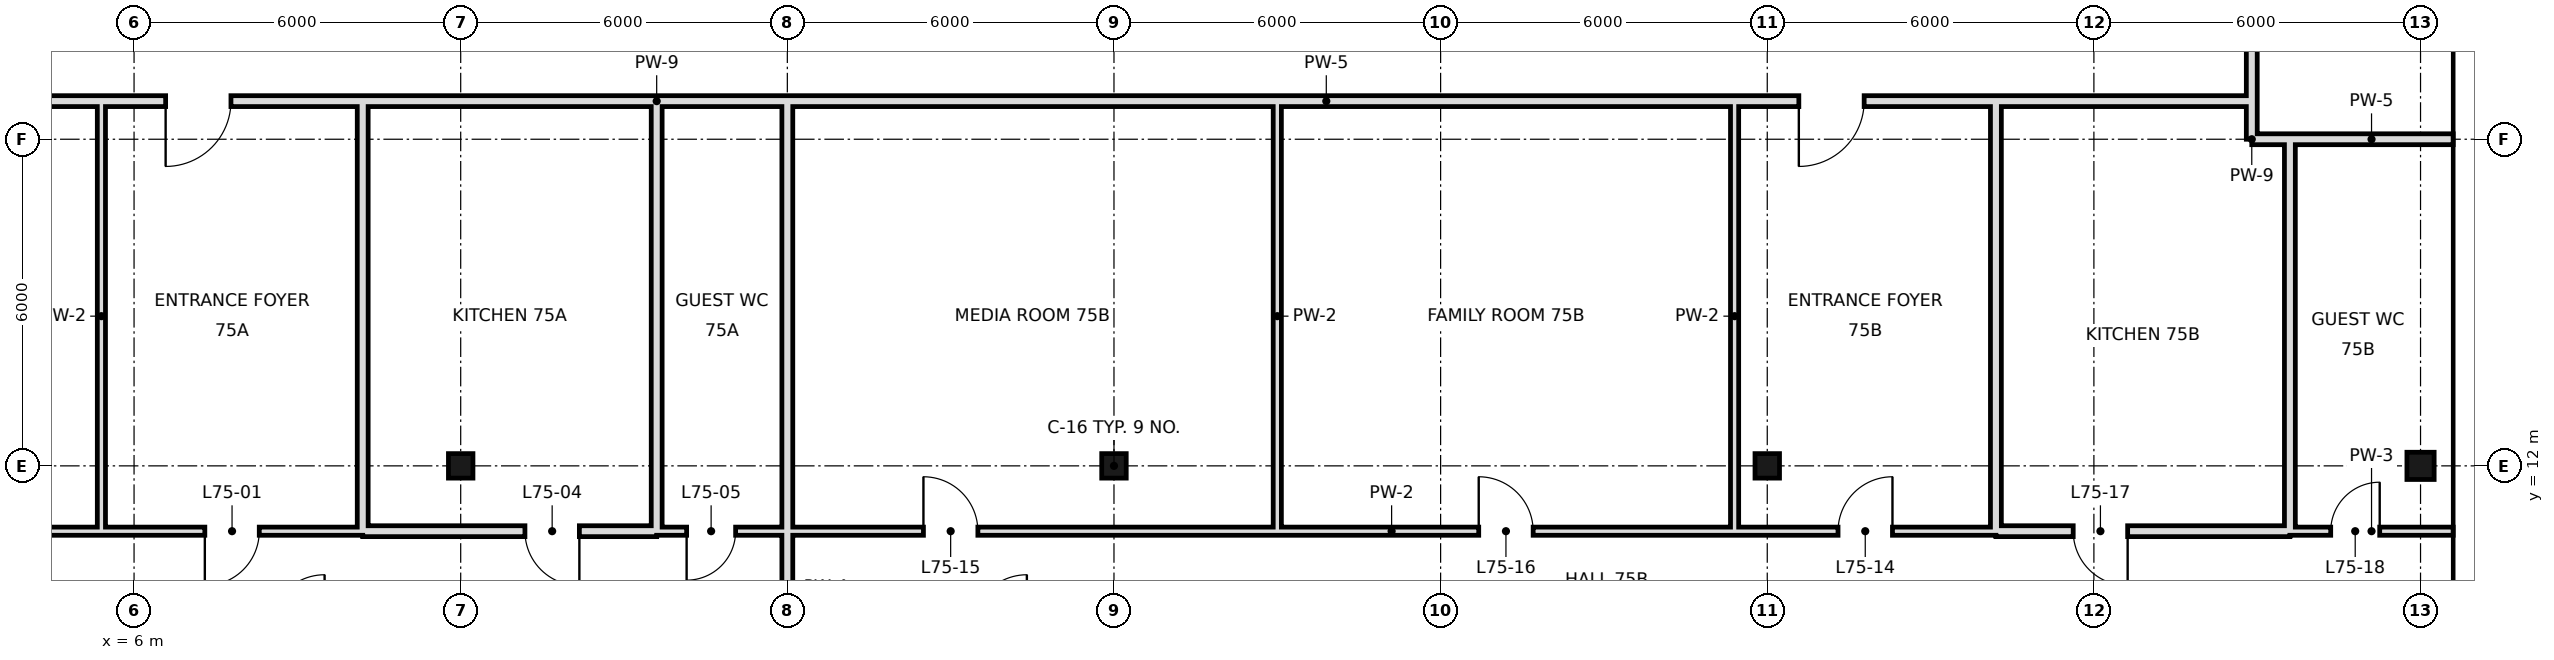
"""IFC4 building model, lengths in metres.
Left out: names, types, materials, properties, quantities, classifications, styles, units other than length and angle.
Written with IfcOpenShell. Run it as: python <this file> out.ifc"""

import sys

from ifc_helpers import new_model, si_unit, direction, frame, frame_2d, origin, origin_2d, place, context, subcontext, project, spatial, rectangle, hollow_rectangle, extrude, element, fill, save


model = new_model("IFC4")
c1 = context("Model", 3, precision=1e-05, world=origin(), true_north=direction((0.0, 1.0)))
c2 = subcontext(c1, "Body", "Model", "MODEL_VIEW")
j1 = project(units=[si_unit("LENGTHUNIT", "METRE"), si_unit("PLANEANGLEUNIT", "RADIAN")], contexts=[c1])
p1 = place(None, origin())
s1 = spatial("IfcSite", under=j1, at=p1, CompositionType="ELEMENT")
p2 = place(p1, origin())
s2 = spatial("IfcBuilding", under=s1, at=p2, CompositionType="ELEMENT")
p3 = place(p2, frame((0.0, 0.0, 316.0)))
s3 = spatial("IfcBuildingStorey", under=s2, at=p3, CompositionType="ELEMENT", Elevation=316.0)
for number, where, z_axis, x_axis in (
    (1, (12.0, 12.0, 0.0), (0.0, 0.0, 1.0), (1.0, 0.0, 0.0)),
    (2, (24.0, 12.0, 0.0), (0.0, 0.0, 1.0), (1.0, 0.0, 0.0)),
    (3, (36.0, 12.0, 0.0), (0.0, 0.0, 1.0), (1.0, 0.0, 0.0)),
):
    element("IfcColumn", number, at=place(p3, frame(where, z_axis=z_axis, x_axis=x_axis)), inside=s3, PredefinedType="COLUMN", context=c2, shape_type="SweptSolid", body=[
        extrude(hollow_rectangle(XDim=0.45, YDim=0.45, WallThickness=0.022, at=origin_2d()), origin(), (0.0, 0.0, 1.0), 3.6),
    ])
p4 = place(p3, frame((48.0, 12.0, 0.0), z_axis=(0.0, 0.0, 1.0), x_axis=(1.0, 0.0, 0.0)))
e4 = element("IfcColumn", 4, at=p4, inside=s3, PredefinedType="COLUMN", context=c2, shape_type="SweptSolid", body=[
    extrude(hollow_rectangle(XDim=0.5, YDim=0.5, WallThickness=0.025, at=origin_2d()), origin(), (0.0, 0.0, 1.0), 3.6),
])
for number, where, z_axis, x_axis in (
    (5, (10.2, 10.8, 0.0), (0.0, 0.0, 1.0), (0.0, 1.0, 0.0)),
    (6, (15.6, 10.8, 0.0), (0.0, 0.0, 1.0), (0.0, 1.0, 0.0)),
):
    element("IfcWall", number, at=place(p3, frame(where, z_axis=z_axis, x_axis=x_axis)), inside=s3, PredefinedType="SOLIDWALL", context=c2, shape_type="SweptSolid", body=[
        extrude(rectangle(XDim=7.9, YDim=0.2, at=frame_2d((3.95, 0.0))), origin(), (0.0, 0.0, 1.0), 2.72),
    ])
p5 = place(p3, frame((18.0, -0.6, 0.0), z_axis=(0.0, 0.0, 1.0), x_axis=(0.0, 1.0, 0.0)))
e7 = element("IfcWall", 7, at=p5, inside=s3, PredefinedType="SOLIDWALL", context=c2, shape_type="SweptSolid", body=[
    extrude(rectangle(XDim=19.3, YDim=0.2, at=frame_2d((9.65, 0.0))), origin(), (0.0, 0.0, 1.0), 2.72),
])
for number, where, z_axis, x_axis in (
    (8, (27.0, 10.8, 0.0), (0.0, 0.0, 1.0), (0.0, 1.0, 0.0)),
    (9, (35.4, 10.8, 0.0), (0.0, 0.0, 1.0), (0.0, 1.0, 0.0)),
):
    element("IfcWall", number, at=place(p3, frame(where, z_axis=z_axis, x_axis=x_axis)), inside=s3, PredefinedType="PARTITIONING", context=c2, shape_type="SweptSolid", body=[
        extrude(rectangle(XDim=7.9, YDim=0.15, at=frame_2d((3.95, 0.0))), origin(), (0.0, 0.0, 1.0), 3.42),
    ])
p6 = place(p3, frame((40.2, 10.8, 0.0), z_axis=(0.0, 0.0, 1.0), x_axis=(0.0, 1.0, 0.0)))
e10 = element("IfcWall", 10, at=p6, inside=s3, PredefinedType="SOLIDWALL", context=c2, shape_type="SweptSolid", body=[
    extrude(rectangle(XDim=7.9, YDim=0.2, at=frame_2d((3.95, 0.0))), origin(), (0.0, 0.0, 1.0), 2.72),
])
p7 = place(p3, frame((44.9, 18.7, 0.0), z_axis=(0.0, 0.0, 1.0), x_axis=(0.0, 1.0, 0.0)))
e11 = element("IfcWall", 11, at=p7, inside=s3, PredefinedType="SOLIDWALL", context=c2, shape_type="SweptSolid", body=[
    extrude(rectangle(XDim=27.249, YDim=0.2, at=frame_2d((13.625, 0.0))), origin(), (0.0, 0.0, 1.0), 2.97),
])
p8 = place(p7, frame((7.66, 0.0, 0.0)))
e12 = element("IfcOpeningElement", 12, at=p8, cuts=e11, PredefinedType="OPENING", context=c2, shape_type="SweptSolid", body=[
    extrude(rectangle(XDim=1.2, YDim=2.4, at=frame_2d((0.6, 1.2))), frame((0.0, 0.11, 0.0), z_axis=(0.0, -1.0, 0.0), x_axis=(1.0, 0.0, 0.0)), (0.0, 0.0, 1.0), 0.22),
])
p9 = place(p3, frame((44.9, 18.0, 0.0), z_axis=(0.0, 0.0, 1.0), x_axis=(0.0, 1.0, 0.0)))
e13 = element("IfcWall", 13, at=p9, inside=s3, PredefinedType="SOLIDWALL", context=c2, shape_type="SweptSolid", body=[
    extrude(rectangle(XDim=0.7, YDim=0.2, at=frame_2d((0.35, 0.0))), origin(), (0.0, 0.0, 1.0), 2.97),
])
p10 = place(p3, frame((45.6, 10.8, 0.0), z_axis=(0.0, 0.0, 1.0), x_axis=(0.0, 1.0, 0.0)))
e14 = element("IfcWall", 14, at=p10, inside=s3, PredefinedType="SOLIDWALL", context=c2, shape_type="SweptSolid", body=[
    extrude(rectangle(XDim=7.2, YDim=0.2, at=frame_2d((3.6, 0.0))), origin(), (0.0, 0.0, 1.0), 2.72),
])
p11 = place(p3, frame((5.4, 10.8, 0.0), z_axis=(0.0, 0.0, 1.0), x_axis=(0.0, 1.0, 0.0)))
e15 = element("IfcWall", 15, at=p11, inside=s3, PredefinedType="PARTITIONING", context=c2, shape_type="SweptSolid", body=[
    extrude(rectangle(XDim=7.9, YDim=0.15, at=frame_2d((3.95, 0.0))), origin(), (0.0, 0.0, 1.0), 3.42),
])
p12 = place(p3, frame((10.2, 10.8, 0.0), z_axis=(0.0, 0.0, 1.0), x_axis=(1.0, 0.0, 0.0)))
e16 = element("IfcWall", 16, at=p12, inside=s3, PredefinedType="SOLIDWALL", context=c2, shape_type="SweptSolid", body=[
    extrude(rectangle(XDim=5.4, YDim=0.2, at=frame_2d((2.7, 0.0))), origin(), (0.0, 0.0, 1.0), 2.72),
])
p13 = place(p12, frame((2.98, 0.0, 0.0)))
e17 = element("IfcOpeningElement", 17, at=p13, cuts=e16, PredefinedType="OPENING", context=c2, shape_type="SweptSolid", body=[
    extrude(rectangle(XDim=1.0, YDim=2.4, at=frame_2d((0.5, 1.2))), frame((0.0, 0.11, 0.0), z_axis=(0.0, -1.0, 0.0), x_axis=(1.0, 0.0, 0.0)), (0.0, 0.0, 1.0), 0.22),
])
p14 = place(p3, frame((40.2, 10.8, 0.0), z_axis=(0.0, 0.0, 1.0), x_axis=(1.0, 0.0, 0.0)))
e18 = element("IfcWall", 18, at=p14, inside=s3, PredefinedType="SOLIDWALL", context=c2, shape_type="SweptSolid", body=[
    extrude(rectangle(XDim=5.4, YDim=0.2, at=frame_2d((2.7, 0.0))), origin(), (0.0, 0.0, 1.0), 2.72),
])
p15 = place(p14, frame((1.42, 0.0, 0.0)))
e19 = element("IfcOpeningElement", 19, at=p15, cuts=e18, PredefinedType="OPENING", context=c2, shape_type="SweptSolid", body=[
    extrude(rectangle(XDim=1.0, YDim=2.4, at=frame_2d((0.5, 1.2))), frame((0.0, 0.11, 0.0), z_axis=(0.0, -1.0, 0.0), x_axis=(1.0, 0.0, 0.0)), (0.0, 0.0, 1.0), 0.22),
])
p16 = place(p3, frame((-18.6, 10.8, 0.0), z_axis=(0.0, 0.0, 1.0), x_axis=(1.0, 0.0, 0.0)))
e20 = element("IfcWall", 20, at=p16, inside=s3, PredefinedType="PARTITIONING", context=c2, shape_type="SweptSolid", body=[
    extrude(rectangle(XDim=28.8, YDim=0.15, at=frame_2d((14.4, 0.0))), origin(), (0.0, 0.0, 1.0), 3.42),
])
p17 = place(p16, frame((25.9, 0.0, 0.0)))
e21 = element("IfcOpeningElement", 21, at=p17, cuts=e20, PredefinedType="OPENING", context=c2, shape_type="SweptSolid", body=[
    extrude(rectangle(XDim=1.0, YDim=2.4, at=frame_2d((0.5, 1.2))), frame((0.0, 0.085, 0.0), z_axis=(0.0, -1.0, 0.0), x_axis=(1.0, 0.0, 0.0)), (0.0, 0.0, 1.0), 0.17),
])
p18 = place(p16, frame((11.35, 0.0, 0.0)))
e22 = element("IfcOpeningElement", 22, at=p18, cuts=e20, PredefinedType="OPENING", context=c2, shape_type="SweptSolid", body=[
    extrude(rectangle(XDim=1.0, YDim=2.4, at=frame_2d((0.5, 1.2))), frame((0.0, 0.085, 0.0), z_axis=(0.0, -1.0, 0.0), x_axis=(1.0, 0.0, 0.0)), (0.0, 0.0, 1.0), 0.17),
])
p19 = place(p16, frame((15.82, 0.0, 0.0)))
e23 = element("IfcOpeningElement", 23, at=p19, cuts=e20, PredefinedType="OPENING", context=c2, shape_type="SweptSolid", body=[
    extrude(rectangle(XDim=1.0, YDim=2.4, at=frame_2d((0.5, 1.2))), frame((0.0, 0.085, 0.0), z_axis=(0.0, -1.0, 0.0), x_axis=(1.0, 0.0, 0.0)), (0.0, 0.0, 1.0), 0.17),
])
p20 = place(p3, frame((18.0, 10.8, 0.0), z_axis=(0.0, 0.0, 1.0), x_axis=(1.0, 0.0, 0.0)))
e24 = element("IfcWall", 24, at=p20, inside=s3, PredefinedType="PARTITIONING", context=c2, shape_type="SweptSolid", body=[
    extrude(rectangle(XDim=22.2, YDim=0.15, at=frame_2d((11.1, 0.0))), origin(), (0.0, 0.0, 1.0), 3.42),
])
p21 = place(p20, frame((19.3, 0.0, 0.0)))
e25 = element("IfcOpeningElement", 25, at=p21, cuts=e24, PredefinedType="OPENING", context=c2, shape_type="SweptSolid", body=[
    extrude(rectangle(XDim=1.0, YDim=2.4, at=frame_2d((0.5, 1.2))), frame((0.0, 0.085, 0.0), z_axis=(0.0, -1.0, 0.0), x_axis=(1.0, 0.0, 0.0)), (0.0, 0.0, 1.0), 0.17),
])
p22 = place(p20, frame((2.5, 0.0, 0.0)))
e26 = element("IfcOpeningElement", 26, at=p22, cuts=e24, PredefinedType="OPENING", context=c2, shape_type="SweptSolid", body=[
    extrude(rectangle(XDim=1.0, YDim=2.4, at=frame_2d((0.5, 1.2))), frame((0.0, 0.085, 0.0), z_axis=(0.0, -1.0, 0.0), x_axis=(1.0, 0.0, 0.0)), (0.0, 0.0, 1.0), 0.17),
])
p23 = place(p20, frame((12.7, 0.0, 0.0)))
e27 = element("IfcOpeningElement", 27, at=p23, cuts=e24, PredefinedType="OPENING", context=c2, shape_type="SweptSolid", body=[
    extrude(rectangle(XDim=1.0, YDim=2.4, at=frame_2d((0.5, 1.2))), frame((0.0, 0.085, 0.0), z_axis=(0.0, -1.0, 0.0), x_axis=(1.0, 0.0, 0.0)), (0.0, 0.0, 1.0), 0.17),
])
p24 = place(p3, frame((15.6, 10.8, 0.0), z_axis=(0.0, 0.0, 1.0), x_axis=(1.0, 0.0, 0.0)))
e28 = element("IfcWall", 28, at=p24, inside=s3, PredefinedType="PARTITIONING", context=c2, shape_type="SweptSolid", body=[
    extrude(rectangle(XDim=2.4, YDim=0.15, at=frame_2d((1.2, 0.0))), origin(), (0.0, 0.0, 1.0), 3.42),
])
p25 = place(p24, frame((0.55, 0.0, 0.0)))
e29 = element("IfcOpeningElement", 29, at=p25, cuts=e28, PredefinedType="OPENING", context=c2, shape_type="SweptSolid", body=[
    extrude(rectangle(XDim=0.9, YDim=2.4, at=frame_2d((0.45, 1.2))), frame((0.0, 0.085, 0.0), z_axis=(0.0, -1.0, 0.0), x_axis=(1.0, 0.0, 0.0)), (0.0, 0.0, 1.0), 0.17),
])
p26 = place(p3, frame((45.6, 10.8, 0.0), z_axis=(0.0, 0.0, 1.0), x_axis=(1.0, 0.0, 0.0)))
e30 = element("IfcWall", 30, at=p26, inside=s3, PredefinedType="PARTITIONING", context=c2, shape_type="SweptSolid", body=[
    extrude(rectangle(XDim=3.0, YDim=0.15, at=frame_2d((1.5, 0.0))), origin(), (0.0, 0.0, 1.0), 3.42),
])
p27 = place(p26, frame((0.75, 0.0, 0.0)))
e31 = element("IfcOpeningElement", 31, at=p27, cuts=e30, PredefinedType="OPENING", context=c2, shape_type="SweptSolid", body=[
    extrude(rectangle(XDim=0.9, YDim=2.4, at=frame_2d((0.45, 1.2))), frame((0.0, 0.085, 0.0), z_axis=(0.0, -1.0, 0.0), x_axis=(1.0, 0.0, 0.0)), (0.0, 0.0, 1.0), 0.17),
])
p28 = place(p3, frame((45.6, 18.0, 0.0), z_axis=(0.0, 0.0, 1.0), x_axis=(1.0, 0.0, 0.0)))
e32 = element("IfcWall", 32, at=p28, inside=s3, PredefinedType="SOLIDWALL", context=c2, shape_type="SweptSolid", body=[
    extrude(rectangle(XDim=3.0, YDim=0.2, at=frame_2d((1.5, 0.0))), origin(), (0.0, 0.0, 1.0), 2.72),
])
p29 = place(p3, frame((44.9, 18.0, 0.0), z_axis=(0.0, 0.0, 1.0), x_axis=(1.0, 0.0, 0.0)))
e33 = element("IfcWall", 33, at=p29, inside=s3, PredefinedType="SOLIDWALL", context=c2, shape_type="SweptSolid", body=[
    extrude(rectangle(XDim=0.7, YDim=0.2, at=frame_2d((0.35, 0.0))), origin(), (0.0, 0.0, 1.0), 2.97),
])
p30 = place(p3, frame((3.1, 18.7, 0.0), z_axis=(0.0, 0.0, 1.0), x_axis=(1.0, 0.0, 0.0)))
e34 = element("IfcWall", 34, at=p30, inside=s3, PredefinedType="SOLIDWALL", context=c2, shape_type="SweptSolid", body=[
    extrude(rectangle(XDim=7.1, YDim=0.2, at=frame_2d((3.55, 0.0))), origin(), (0.0, 0.0, 1.0), 2.72),
])
p31 = place(p30, frame((3.48, 0.0, 0.0)))
e35 = element("IfcOpeningElement", 35, at=p31, cuts=e34, PredefinedType="OPENING", context=c2, shape_type="SweptSolid", body=[
    extrude(rectangle(XDim=1.2, YDim=2.4, at=frame_2d((0.6, 1.2))), frame((0.0, 0.11, 0.0), z_axis=(0.0, -1.0, 0.0), x_axis=(1.0, 0.0, 0.0)), (0.0, 0.0, 1.0), 0.22),
])
p32 = place(p3, frame((15.6, 18.7, 0.0), z_axis=(0.0, 0.0, 1.0), x_axis=(1.0, 0.0, 0.0)))
e36 = element("IfcWall", 36, at=p32, inside=s3, PredefinedType="SOLIDWALL", context=c2, shape_type="SweptSolid", body=[
    extrude(rectangle(XDim=24.6, YDim=0.2, at=frame_2d((12.3, 0.0))), origin(), (0.0, 0.0, 1.0), 2.72),
])
p33 = place(p32, frame((20.98, 0.0, 0.0)))
e37 = element("IfcOpeningElement", 37, at=p33, cuts=e36, PredefinedType="OPENING", context=c2, shape_type="SweptSolid", body=[
    extrude(rectangle(XDim=1.2, YDim=2.4, at=frame_2d((0.6, 1.2))), frame((0.0, 0.11, 0.0), z_axis=(0.0, -1.0, 0.0), x_axis=(1.0, 0.0, 0.0)), (0.0, 0.0, 1.0), 0.22),
])
p34 = place(p3, frame((10.2, 18.7, 0.0), z_axis=(0.0, 0.0, 1.0), x_axis=(1.0, 0.0, 0.0)))
e38 = element("IfcWall", 38, at=p34, inside=s3, PredefinedType="SOLIDWALL", context=c2, shape_type="SweptSolid", body=[
    extrude(rectangle(XDim=5.4, YDim=0.2, at=frame_2d((2.7, 0.0))), origin(), (0.0, 0.0, 1.0), 3.42),
])
p35 = place(p3, frame((40.2, 18.7, 0.0), z_axis=(0.0, 0.0, 1.0), x_axis=(1.0, 0.0, 0.0)))
e39 = element("IfcWall", 39, at=p35, inside=s3, PredefinedType="SOLIDWALL", context=c2, shape_type="SweptSolid", body=[
    extrude(rectangle(XDim=4.7, YDim=0.2, at=frame_2d((2.35, 0.0))), origin(), (0.0, 0.0, 1.0), 2.72),
])
p36 = place(p17, frame((1.0, 0.0, 0.0), z_axis=(0.0, 0.0, 1.0), x_axis=(-1.0, 0.0, 0.0)))
e40 = element("IfcDoor", 40, at=p36, inside=s3, OperationType="SINGLE_SWING_RIGHT", PredefinedType="DOOR", context=c2, shape_type="SweptSolid", body=[
    extrude(rectangle(XDim=1.0, YDim=2.4, at=frame_2d((0.5, 1.2))), frame((0.0, 0.025, 0.0), z_axis=(0.0, -1.0, 0.0), x_axis=(1.0, 0.0, 0.0)), (0.0, 0.0, 1.0), 0.05),
])
fill(e21, e40)
p37 = place(p13, origin())
e41 = element("IfcDoor", 41, at=p37, inside=s3, OperationType="SINGLE_SWING_RIGHT", PredefinedType="DOOR", context=c2, shape_type="SweptSolid", body=[
    extrude(rectangle(XDim=1.0, YDim=2.4, at=frame_2d((0.5, 1.2))), frame((0.0, 0.025, 0.0), z_axis=(0.0, -1.0, 0.0), x_axis=(1.0, 0.0, 0.0)), (0.0, 0.0, 1.0), 0.05),
])
fill(e17, e41)
p38 = place(p25, frame((0.9, 0.0, 0.0), z_axis=(0.0, 0.0, 1.0), x_axis=(-1.0, 0.0, 0.0)))
e42 = element("IfcDoor", 42, at=p38, inside=s3, OperationType="SINGLE_SWING_RIGHT", PredefinedType="DOOR", context=c2, shape_type="SweptSolid", body=[
    extrude(rectangle(XDim=0.9, YDim=2.4, at=frame_2d((0.45, 1.2))), frame((0.0, 0.025, 0.0), z_axis=(0.0, -1.0, 0.0), x_axis=(1.0, 0.0, 0.0)), (0.0, 0.0, 1.0), 0.05),
])
fill(e29, e42)
p39 = place(p21, frame((1.0, 0.0, 0.0), z_axis=(0.0, 0.0, 1.0), x_axis=(-1.0, 0.0, 0.0)))
e43 = element("IfcDoor", 43, at=p39, inside=s3, OperationType="SINGLE_SWING_LEFT", PredefinedType="DOOR", context=c2, shape_type="SweptSolid", body=[
    extrude(rectangle(XDim=1.0, YDim=2.4, at=frame_2d((0.5, 1.2))), frame((0.0, 0.025, 0.0), z_axis=(0.0, -1.0, 0.0), x_axis=(1.0, 0.0, 0.0)), (0.0, 0.0, 1.0), 0.05),
])
fill(e25, e43)
p40 = place(p22, origin())
e44 = element("IfcDoor", 44, at=p40, inside=s3, OperationType="SINGLE_SWING_LEFT", PredefinedType="DOOR", context=c2, shape_type="SweptSolid", body=[
    extrude(rectangle(XDim=1.0, YDim=2.4, at=frame_2d((0.5, 1.2))), frame((0.0, 0.025, 0.0), z_axis=(0.0, -1.0, 0.0), x_axis=(1.0, 0.0, 0.0)), (0.0, 0.0, 1.0), 0.05),
])
fill(e26, e44)
p41 = place(p23, origin())
e45 = element("IfcDoor", 45, at=p41, inside=s3, OperationType="SINGLE_SWING_LEFT", PredefinedType="DOOR", context=c2, shape_type="SweptSolid", body=[
    extrude(rectangle(XDim=1.0, YDim=2.4, at=frame_2d((0.5, 1.2))), frame((0.0, 0.025, 0.0), z_axis=(0.0, -1.0, 0.0), x_axis=(1.0, 0.0, 0.0)), (0.0, 0.0, 1.0), 0.05),
])
fill(e27, e45)
p42 = place(p15, origin())
e46 = element("IfcDoor", 46, at=p42, inside=s3, OperationType="SINGLE_SWING_RIGHT", PredefinedType="DOOR", context=c2, shape_type="SweptSolid", body=[
    extrude(rectangle(XDim=1.0, YDim=2.4, at=frame_2d((0.5, 1.2))), frame((0.0, 0.025, 0.0), z_axis=(0.0, -1.0, 0.0), x_axis=(1.0, 0.0, 0.0)), (0.0, 0.0, 1.0), 0.05),
])
fill(e19, e46)
p43 = place(p27, frame((0.9, 0.0, 0.0), z_axis=(0.0, 0.0, 1.0), x_axis=(-1.0, 0.0, 0.0)))
e47 = element("IfcDoor", 47, at=p43, inside=s3, OperationType="SINGLE_SWING_LEFT", PredefinedType="DOOR", context=c2, shape_type="SweptSolid", body=[
    extrude(rectangle(XDim=0.9, YDim=2.4, at=frame_2d((0.45, 1.2))), frame((0.0, 0.025, 0.0), z_axis=(0.0, -1.0, 0.0), x_axis=(1.0, 0.0, 0.0)), (0.0, 0.0, 1.0), 0.05),
])
fill(e31, e47)
p44 = place(p31, frame((1.2, 0.0, 0.0), z_axis=(0.0, 0.0, 1.0), x_axis=(-1.0, 0.0, 0.0)))
e48 = element("IfcDoor", 48, at=p44, inside=s3, OperationType="SINGLE_SWING_RIGHT", PredefinedType="DOOR", context=c2, shape_type="SweptSolid", body=[
    extrude(rectangle(XDim=1.2, YDim=2.4, at=frame_2d((0.6, 1.2))), frame((0.0, 0.025, 0.0), z_axis=(0.0, -1.0, 0.0), x_axis=(1.0, 0.0, 0.0)), (0.0, 0.0, 1.0), 0.05),
])
fill(e35, e48)
p45 = place(p33, frame((1.2, 0.0, 0.0), z_axis=(0.0, 0.0, 1.0), x_axis=(-1.0, 0.0, 0.0)))
e49 = element("IfcDoor", 49, at=p45, inside=s3, OperationType="SINGLE_SWING_RIGHT", PredefinedType="DOOR", context=c2, shape_type="SweptSolid", body=[
    extrude(rectangle(XDim=1.2, YDim=2.4, at=frame_2d((0.6, 1.2))), frame((0.0, 0.025, 0.0), z_axis=(0.0, -1.0, 0.0), x_axis=(1.0, 0.0, 0.0)), (0.0, 0.0, 1.0), 0.05),
])
fill(e37, e49)
save(model, sys.argv[1])
